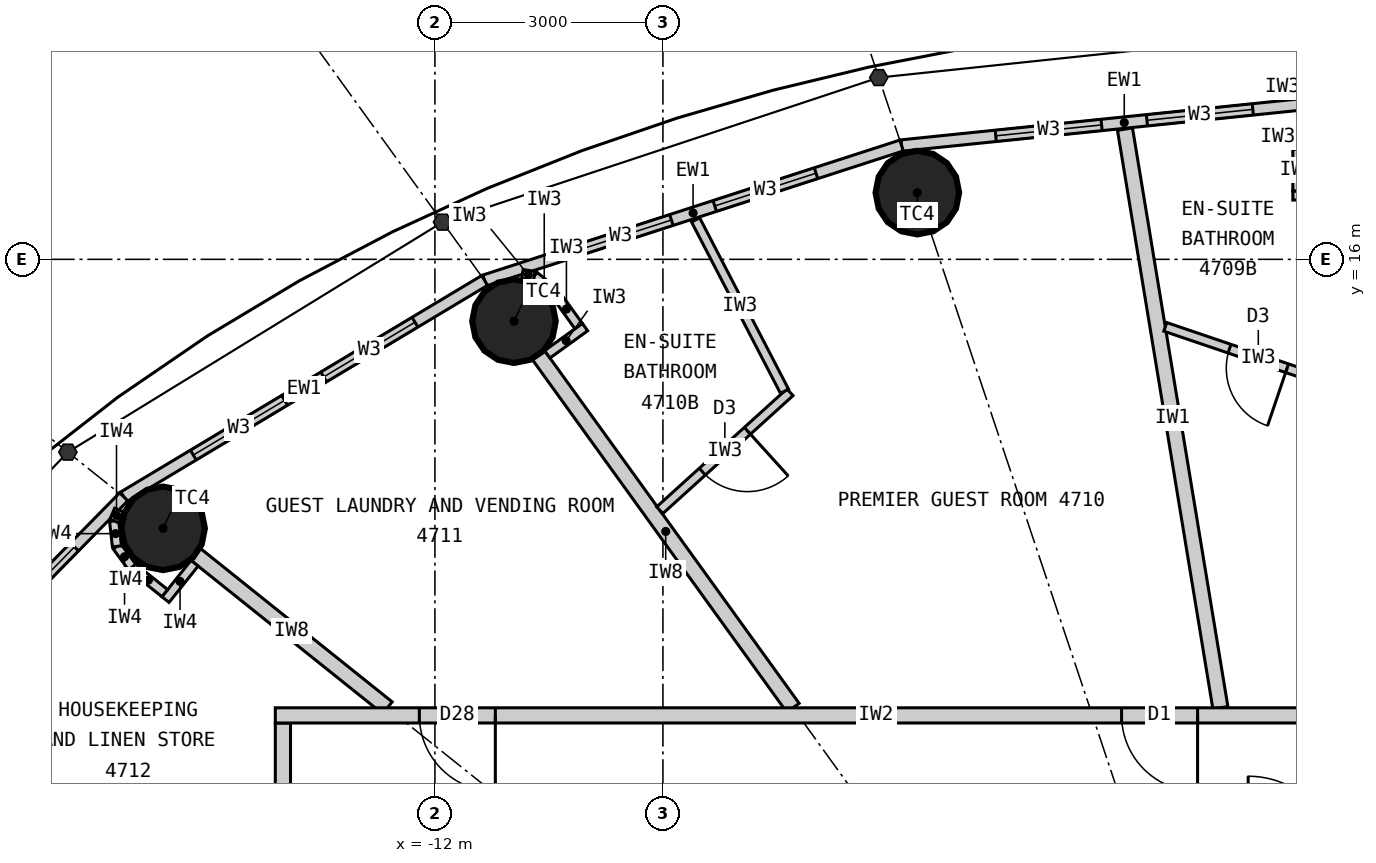
"""IFC4 building model, lengths in metres.
Left out: names, types, materials, properties, quantities, classifications, styles, units other than length and angle.
Written with IfcOpenShell. Run it as: python <this file> out.ifc"""

import sys

from ifc_helpers import new_model, si_unit, direction, frame, frame_2d, origin, origin_2d, place, context, subcontext, project, spatial, rectangle, circle, extrude, element, fill, save


model = new_model("IFC4")
c1 = context("Model", 3, precision=1e-05, world=origin(), true_north=direction((0.0, 1.0)))
c2 = subcontext(c1, "Body", "Model", "MODEL_VIEW")
j1 = project(units=[si_unit("LENGTHUNIT", "METRE"), si_unit("PLANEANGLEUNIT", "RADIAN")], contexts=[c1])
p1 = place(None, origin())
s1 = spatial("IfcSite", under=j1, at=p1, CompositionType="ELEMENT")
p2 = place(p1, origin())
s2 = spatial("IfcBuilding", under=s1, at=p2, CompositionType="ELEMENT")
p3 = place(p2, frame((0.0, 0.0, 176.4)))
s3 = spatial("IfcBuildingStorey", under=s2, at=p3, CompositionType="ELEMENT", Elevation=176.4)
for number, where, z_axis, x_axis in (
    (1, (-5.653, 16.877, 0.0), (0.0, 0.0, 1.0), (1.0, 0.0, 0.0)),
    (2, (-10.96, 15.186, 0.0), (0.0, 0.0, 1.0), (1.0, 0.0, 0.0)),
    (3, (-15.576, 12.461, 0.0), (0.0, 0.0, 1.0), (1.0, 0.0, 0.0)),
):
    element("IfcColumn", number, at=place(p3, frame(where, z_axis=z_axis, x_axis=x_axis)), inside=s3, PredefinedType="COLUMN", context=c2, shape_type="SweptSolid", body=[
        extrude(circle(Radius=0.55, at=origin_2d()), origin(), (0.0, 0.0, 1.0), 3.3),
    ])
p4 = place(p3, frame((0.0, 18.1, 0.0), z_axis=(0.0, 0.0, 1.0), x_axis=(-0.994751738032, -0.102318032045, 0.0)))
e4 = element("IfcWall", 4, at=p4, inside=s3, PredefinedType="ELEMENTEDWALL", context=c2, shape_type="SweptSolid", body=[
    extrude(rectangle(XDim=5.891, YDim=0.15, at=frame_2d((2.946, 0.0))), origin(), (0.0, 0.0, 1.0), 3.12),
])
p5 = place(p4, frame((1.246, 0.0, 0.9)))
e5 = element("IfcOpeningElement", 5, at=p5, cuts=e4, PredefinedType="OPENING", context=c2, shape_type="SweptSolid", body=[
    extrude(rectangle(XDim=1.4, YDim=1.9, at=frame_2d((0.7, 0.95))), frame((0.0, 0.085, 0.0), z_axis=(0.0, -1.0, 0.0), x_axis=(1.0, 0.0, 0.0)), (0.0, 0.0, 1.0), 0.17),
])
p6 = place(p4, frame((3.246, 0.0, 0.9)))
e6 = element("IfcOpeningElement", 6, at=p6, cuts=e4, PredefinedType="OPENING", context=c2, shape_type="SweptSolid", body=[
    extrude(rectangle(XDim=1.4, YDim=1.9, at=frame_2d((0.7, 0.95))), frame((0.0, 0.085, 0.0), z_axis=(0.0, -1.0, 0.0), x_axis=(1.0, 0.0, 0.0)), (0.0, 0.0, 1.0), 0.17),
])
p7 = place(p3, frame((-5.86, 17.497, 0.0), z_axis=(0.0, 0.0, 1.0), x_axis=(-0.951432482129, -0.307857486429, 0.0)))
e7 = element("IfcWall", 7, at=p7, inside=s3, PredefinedType="ELEMENTEDWALL", context=c2, shape_type="SweptSolid", body=[
    extrude(rectangle(XDim=5.766, YDim=0.15, at=frame_2d((2.883, 0.0))), origin(), (0.0, 0.0, 1.0), 3.12),
])
p8 = place(p7, frame((1.183, 0.0, 0.9)))
e8 = element("IfcOpeningElement", 8, at=p8, cuts=e7, PredefinedType="OPENING", context=c2, shape_type="SweptSolid", body=[
    extrude(rectangle(XDim=1.4, YDim=1.9, at=frame_2d((0.7, 0.95))), frame((0.0, 0.085, 0.0), z_axis=(0.0, -1.0, 0.0), x_axis=(1.0, 0.0, 0.0)), (0.0, 0.0, 1.0), 0.17),
])
p9 = place(p7, frame((3.183, 0.0, 0.9)))
e9 = element("IfcOpeningElement", 9, at=p9, cuts=e7, PredefinedType="OPENING", context=c2, shape_type="SweptSolid", body=[
    extrude(rectangle(XDim=1.4, YDim=1.9, at=frame_2d((0.7, 0.95))), frame((0.0, 0.085, 0.0), z_axis=(0.0, -1.0, 0.0), x_axis=(1.0, 0.0, 0.0)), (0.0, 0.0, 1.0), 0.17),
])
p10 = place(p3, frame((-11.346, 15.722, 0.0), z_axis=(0.0, 0.0, 1.0), x_axis=(-0.857695199231, -0.514158482587, 0.0)))
e10 = element("IfcWall", 10, at=p10, inside=s3, PredefinedType="ELEMENTEDWALL", context=c2, shape_type="SweptSolid", body=[
    extrude(rectangle(XDim=5.536, YDim=0.15, at=frame_2d((2.768, 0.0))), origin(), (0.0, 0.0, 1.0), 3.12),
])
p11 = place(p10, frame((1.068, 0.0, 0.9)))
e11 = element("IfcOpeningElement", 11, at=p11, cuts=e10, PredefinedType="OPENING", context=c2, shape_type="SweptSolid", body=[
    extrude(rectangle(XDim=1.4, YDim=1.9, at=frame_2d((0.7, 0.95))), frame((0.0, 0.085, 0.0), z_axis=(0.0, -1.0, 0.0), x_axis=(1.0, 0.0, 0.0)), (0.0, 0.0, 1.0), 0.17),
])
p12 = place(p10, frame((3.068, 0.0, 0.9)))
e12 = element("IfcOpeningElement", 12, at=p12, cuts=e10, PredefinedType="OPENING", context=c2, shape_type="SweptSolid", body=[
    extrude(rectangle(XDim=1.4, YDim=1.9, at=frame_2d((0.7, 0.95))), frame((0.0, 0.085, 0.0), z_axis=(0.0, -1.0, 0.0), x_axis=(1.0, 0.0, 0.0)), (0.0, 0.0, 1.0), 0.17),
])
p13 = place(p3, frame((-16.095, 12.876, 0.0), z_axis=(0.0, 0.0, 1.0), x_axis=(-0.700727467776, -0.71342905457, 0.0)))
e13 = element("IfcWall", 13, at=p13, inside=s3, PredefinedType="ELEMENTEDWALL", context=c2, shape_type="SweptSolid", body=[
    extrude(rectangle(XDim=5.247, YDim=0.15, at=frame_2d((2.624, 0.0))), origin(), (0.0, 0.0, 1.0), 3.12),
])
p14 = place(p13, frame((0.924, 0.0, 0.9)))
e14 = element("IfcOpeningElement", 14, at=p14, cuts=e13, PredefinedType="OPENING", context=c2, shape_type="SweptSolid", body=[
    extrude(rectangle(XDim=1.4, YDim=1.9, at=frame_2d((0.7, 0.95))), frame((0.0, 0.085, 0.0), z_axis=(0.0, -1.0, 0.0), x_axis=(1.0, 0.0, 0.0)), (0.0, 0.0, 1.0), 0.17),
])
p15 = place(p13, frame((2.924, 0.0, 0.9)))
e15 = element("IfcOpeningElement", 15, at=p15, cuts=e13, PredefinedType="OPENING", context=c2, shape_type="SweptSolid", body=[
    extrude(rectangle(XDim=1.4, YDim=1.9, at=frame_2d((0.7, 0.95))), frame((0.0, 0.085, 0.0), z_axis=(0.0, -1.0, 0.0), x_axis=(1.0, 0.0, 0.0)), (0.0, 0.0, 1.0), 0.17),
])
p16 = place(p3, frame((-14.0, 9.9, 0.0), z_axis=(0.0, 0.0, 1.0), x_axis=(0.0, -1.0, 0.0)))
e16 = element("IfcWall", 16, at=p16, inside=s3, PredefinedType="PARTITIONING", context=c2, shape_type="SweptSolid", body=[
    extrude(rectangle(XDim=19.8, YDim=0.2, at=frame_2d((9.9, 0.0))), origin(), (0.0, 0.0, 1.0), 3.12),
])
p17 = place(p16, frame((13.853, 0.0, 0.0)))
e17 = element("IfcOpeningElement", 17, at=p17, cuts=e16, PredefinedType="OPENING", context=c2, shape_type="SweptSolid", body=[
    extrude(rectangle(XDim=1.0, YDim=2.2, at=frame_2d((0.5, 1.1))), frame((0.0, 0.11, 0.0), z_axis=(0.0, -1.0, 0.0), x_axis=(1.0, 0.0, 0.0)), (0.0, 0.0, 1.0), 0.22),
])
p18 = place(p16, frame((1.1, 0.0, 0.0)))
e18 = element("IfcOpeningElement", 18, at=p18, cuts=e16, PredefinedType="OPENING", context=c2, shape_type="SweptSolid", body=[
    extrude(rectangle(XDim=1.0, YDim=2.2, at=frame_2d((0.5, 1.1))), frame((0.0, 0.11, 0.0), z_axis=(0.0, -1.0, 0.0), x_axis=(1.0, 0.0, 0.0)), (0.0, 0.0, 1.0), 0.22),
])
p19 = place(p16, frame((3.688, 0.0, 0.0)))
e19 = element("IfcOpeningElement", 19, at=p19, cuts=e16, PredefinedType="OPENING", context=c2, shape_type="SweptSolid", body=[
    extrude(rectangle(XDim=1.0, YDim=2.2, at=frame_2d((0.5, 1.1))), frame((0.0, 0.11, 0.0), z_axis=(0.0, -1.0, 0.0), x_axis=(1.0, 0.0, 0.0)), (0.0, 0.0, 1.0), 0.22),
])
p20 = place(p16, frame((8.719, 0.0, 0.0)))
e20 = element("IfcOpeningElement", 20, at=p20, cuts=e16, PredefinedType="OPENING", context=c2, shape_type="SweptSolid", body=[
    extrude(rectangle(XDim=1.0, YDim=2.2, at=frame_2d((0.5, 1.1))), frame((0.0, 0.11, 0.0), z_axis=(0.0, -1.0, 0.0), x_axis=(1.0, 0.0, 0.0)), (0.0, 0.0, 1.0), 0.22),
])
p21 = place(p3, frame((-1.666, 10.1, 0.0), z_axis=(0.0, 0.0, 1.0), x_axis=(-0.162669562982, 0.986680603478, 0.0)))
e21 = element("IfcWall", 21, at=p21, inside=s3, PredefinedType="PARTITIONING", context=c2, shape_type="SweptSolid", body=[
    extrude(rectangle(XDim=7.716, YDim=0.2, at=frame_2d((3.858, 0.0))), origin(), (0.0, 0.0, 1.0), 3.12),
])
p22 = place(p3, frame((-7.289, 10.1, 0.0), z_axis=(0.0, 0.0, 1.0), x_axis=(-0.585222595178, 0.810872686735, 0.0)))
e22 = element("IfcWall", 22, at=p22, inside=s3, PredefinedType="PARTITIONING", context=c2, shape_type="SweptSolid", body=[
    extrude(rectangle(XDim=5.722, YDim=0.2, at=frame_2d((2.861, 0.0))), origin(), (0.0, 0.0, 1.0), 2.42),
])
p23 = place(p3, frame((-12.625, 10.1, 0.0), z_axis=(0.0, 0.0, 1.0), x_axis=(-0.780876185034, 0.624685827954, 0.0)))
e23 = element("IfcWall", 23, at=p23, inside=s3, PredefinedType="PARTITIONING", context=c2, shape_type="SweptSolid", body=[
    extrude(rectangle(XDim=3.229, YDim=0.2, at=frame_2d((1.615, 0.0))), origin(), (0.0, 0.0, 1.0), 2.42),
])
p24 = place(p3, frame((-2.39, 15.111, 0.0), z_axis=(0.0, 0.0, 1.0), x_axis=(0.946949953534, -0.321381059649, 0.0)))
e24 = element("IfcWall", 24, at=p24, inside=s3, PredefinedType="PARTITIONING", context=c2, shape_type="SweptSolid", body=[
    extrude(rectangle(XDim=2.584, YDim=0.12, at=frame_2d((1.292, 0.0))), origin(), (0.0, 0.0, 1.0), 3.12),
])
p25 = place(p24, frame((0.892, 0.0, 0.0)))
e25 = element("IfcOpeningElement", 25, at=p25, cuts=e24, PredefinedType="OPENING", context=c2, shape_type="SweptSolid", body=[
    extrude(rectangle(XDim=0.8, YDim=2.1, at=frame_2d((0.4, 1.05))), frame((0.0, 0.07, 0.0), z_axis=(0.0, -1.0, 0.0), x_axis=(1.0, 0.0, 0.0)), (0.0, 0.0, 1.0), 0.14),
])
p26 = place(p3, frame((-0.06, 16.84, 0.0), z_axis=(0.0, 0.0, 1.0), x_axis=(-1.0, 0.0, 0.0)))
e26 = element("IfcWall", 26, at=p26, inside=s3, PredefinedType="PARTITIONING", context=c2, shape_type="SweptSolid", body=[
    extrude(rectangle(XDim=0.652, YDim=0.12, at=frame_2d((0.326, 0.0))), origin(), (0.0, 0.0, 1.0), 3.12),
])
p27 = place(p3, frame((-0.652, 16.9, 0.0), z_axis=(0.0, 0.0, 1.0), x_axis=(0.0, 1.0, 0.0)))
e27 = element("IfcWall", 27, at=p27, inside=s3, PredefinedType="PARTITIONING", context=c2, shape_type="SweptSolid", body=[
    extrude(rectangle(XDim=0.55, YDim=0.12, at=frame_2d((0.275, 0.0))), origin(), (0.0, 0.0, 1.0), 3.12),
])
p28 = place(p3, frame((-0.652, 17.45, 0.0), z_axis=(0.0, 0.0, 1.0), x_axis=(0.258832454679, 0.965922233104, 0.0)))
e28 = element("IfcWall", 28, at=p28, inside=s3, PredefinedType="PARTITIONING", context=c2, shape_type="SweptSolid", body=[
    extrude(rectangle(XDim=0.338, YDim=0.12, at=frame_2d((0.169, 0.0))), origin(), (0.0, 0.0, 1.0), 3.12),
])
p29 = place(p3, frame((-9.042, 12.699, 0.0), z_axis=(0.0, 0.0, 1.0), x_axis=(0.741100257539, 0.671394376112, 0.0)))
e29 = element("IfcWall", 29, at=p29, inside=s3, PredefinedType="PARTITIONING", context=c2, shape_type="SweptSolid", body=[
    extrude(rectangle(XDim=2.312, YDim=0.12, at=frame_2d((1.156, 0.0))), origin(), (0.0, 0.0, 1.0), 3.12),
])
p30 = place(p29, frame((0.756, 0.0, 0.0)))
e30 = element("IfcOpeningElement", 30, at=p30, cuts=e29, PredefinedType="OPENING", context=c2, shape_type="SweptSolid", body=[
    extrude(rectangle(XDim=0.8, YDim=2.1, at=frame_2d((0.4, 1.05))), frame((0.0, 0.07, 0.0), z_axis=(0.0, -1.0, 0.0), x_axis=(1.0, 0.0, 0.0)), (0.0, 0.0, 1.0), 0.14),
])
p31 = place(p3, frame((-7.401, 14.264, 0.0), z_axis=(0.0, 0.0, 1.0), x_axis=(-0.460505131319, 0.887657041897, 0.0)))
e31 = element("IfcWall", 31, at=p31, inside=s3, PredefinedType="PARTITIONING", context=c2, shape_type="SweptSolid", body=[
    extrude(rectangle(XDim=2.54, YDim=0.12, at=frame_2d((1.27, 0.0))), origin(), (0.0, 0.0, 1.0), 3.12),
])
p32 = place(p3, frame((-10.522, 14.75, 0.0), z_axis=(0.0, 0.0, 1.0), x_axis=(0.811057588427, 0.584966313777, 0.0)))
e32 = element("IfcWall", 32, at=p32, inside=s3, PredefinedType="PARTITIONING", context=c2, shape_type="SweptSolid", body=[
    extrude(rectangle(XDim=0.612, YDim=0.12, at=frame_2d((0.306, 0.0))), origin(), (0.0, 0.0, 1.0), 3.12),
])
p33 = place(p3, frame((-10.109, 15.122, 0.0), z_axis=(0.0, 0.0, 1.0), x_axis=(-0.585344718358, 0.810784534072, 0.0)))
e33 = element("IfcWall", 33, at=p33, inside=s3, PredefinedType="PARTITIONING", context=c2, shape_type="SweptSolid", body=[
    extrude(rectangle(XDim=0.55, YDim=0.12, at=frame_2d((0.275, 0.0))), origin(), (0.0, 0.0, 1.0), 3.12),
])
p34 = place(p3, frame((-10.431, 15.568, 0.0), z_axis=(0.0, 0.0, 1.0), x_axis=(-0.77505137267, 0.631898227345, 0.0)))
e34 = element("IfcWall", 34, at=p34, inside=s3, PredefinedType="PARTITIONING", context=c2, shape_type="SweptSolid", body=[
    extrude(rectangle(XDim=0.338, YDim=0.12, at=frame_2d((0.169, 0.0))), origin(), (0.0, 0.0, 1.0), 3.12),
])
p35 = place(p3, frame((-10.693, 15.781, 0.0), z_axis=(0.0, 0.0, 1.0), x_axis=(-0.987256785332, 0.159135287777, 0.0)))
e35 = element("IfcWall", 35, at=p35, inside=s3, PredefinedType="PARTITIONING", context=c2, shape_type="SweptSolid", body=[
    extrude(rectangle(XDim=0.158, YDim=0.12, at=frame_2d((0.079, 0.0))), origin(), (0.0, 0.0, 1.0), 3.12),
])
p36 = place(p3, frame((-14.1, 10.0, 0.0), z_axis=(0.0, 0.0, 1.0), x_axis=(1.0, 0.0, 0.0)))
e36 = element("IfcWall", 36, at=p36, inside=s3, PredefinedType="PARTITIONING", context=c2, shape_type="SweptSolid", body=[
    extrude(rectangle(XDim=15.808, YDim=0.2, at=frame_2d((7.904, 0.0))), origin(), (0.0, 0.0, 1.0), 3.12),
])
p37 = place(p36, frame((11.135, 0.0, 0.0)))
e37 = element("IfcOpeningElement", 37, at=p37, cuts=e36, PredefinedType="OPENING", context=c2, shape_type="SweptSolid", body=[
    extrude(rectangle(XDim=1.0, YDim=2.2, at=frame_2d((0.5, 1.1))), frame((0.0, 0.11, 0.0), z_axis=(0.0, -1.0, 0.0), x_axis=(1.0, 0.0, 0.0)), (0.0, 0.0, 1.0), 0.22),
])
p38 = place(p36, frame((1.895, 0.0, 0.0)))
e38 = element("IfcOpeningElement", 38, at=p38, cuts=e36, PredefinedType="OPENING", context=c2, shape_type="SweptSolid", body=[
    extrude(rectangle(XDim=1.0, YDim=2.2, at=frame_2d((0.5, 1.1))), frame((0.0, 0.11, 0.0), z_axis=(0.0, -1.0, 0.0), x_axis=(1.0, 0.0, 0.0)), (0.0, 0.0, 1.0), 0.22),
])
p39 = place(p3, frame((-15.162, 12.002, 0.0), z_axis=(0.0, 0.0, 1.0), x_axis=(-0.624597762427, -0.780946627607, 0.0)))
e39 = element("IfcWall", 39, at=p39, inside=s3, PredefinedType="PARTITIONING", context=c2, shape_type="SweptSolid", body=[
    extrude(rectangle(XDim=0.612, YDim=0.12, at=frame_2d((0.306, 0.0))), origin(), (0.0, 0.0, 1.0), 3.12),
])
p40 = place(p3, frame((-15.554, 11.608, 0.0), z_axis=(0.0, 0.0, 1.0), x_axis=(-0.780695577787, 0.624911525597, 0.0)))
e40 = element("IfcWall", 40, at=p40, inside=s3, PredefinedType="PARTITIONING", context=c2, shape_type="SweptSolid", body=[
    extrude(rectangle(XDim=0.55, YDim=0.12, at=frame_2d((0.275, 0.0))), origin(), (0.0, 0.0, 1.0), 3.12),
])
p41 = place(p3, frame((-15.984, 11.952, 0.0), z_axis=(0.0, 0.0, 1.0), x_axis=(-0.592335221171, 0.805691619517, 0.0)))
e41 = element("IfcWall", 41, at=p41, inside=s3, PredefinedType="PARTITIONING", context=c2, shape_type="SweptSolid", body=[
    extrude(rectangle(XDim=0.338, YDim=0.12, at=frame_2d((0.169, 0.0))), origin(), (0.0, 0.0, 1.0), 3.12),
])
p42 = place(p3, frame((-16.184, 12.224, 0.0), z_axis=(0.0, 0.0, 1.0), x_axis=(-0.110669692975, 0.993857242795, 0.0)))
e42 = element("IfcWall", 42, at=p42, inside=s3, PredefinedType="PARTITIONING", context=c2, shape_type="SweptSolid", body=[
    extrude(rectangle(XDim=0.337, YDim=0.12, at=frame_2d((0.169, 0.0))), origin(), (0.0, 0.0, 1.0), 3.12),
])
p43 = place(p3, frame((-16.221, 12.559, 0.0), z_axis=(0.0, 0.0, 1.0), x_axis=(0.401064416249, 0.916049853457, 0.0)))
e43 = element("IfcWall", 43, at=p43, inside=s3, PredefinedType="PARTITIONING", context=c2, shape_type="SweptSolid", body=[
    extrude(rectangle(XDim=0.156, YDim=0.12, at=frame_2d((0.078, 0.0))), origin(), (0.0, 0.0, 1.0), 3.12),
])
p44 = place(p5, origin())
e44 = element("IfcWindow", 44, at=p44, inside=s3, PartitioningType="SINGLE_PANEL", PredefinedType="WINDOW", context=c2, shape_type="SweptSolid", body=[
    extrude(rectangle(XDim=1.4, YDim=1.9, at=frame_2d((0.7, 0.95))), frame((0.0, 0.03, 0.0), z_axis=(0.0, -1.0, 0.0), x_axis=(1.0, 0.0, 0.0)), (0.0, 0.0, 1.0), 0.06),
])
fill(e5, e44)
p45 = place(p6, origin())
e45 = element("IfcWindow", 45, at=p45, inside=s3, PartitioningType="SINGLE_PANEL", PredefinedType="WINDOW", context=c2, shape_type="SweptSolid", body=[
    extrude(rectangle(XDim=1.4, YDim=1.9, at=frame_2d((0.7, 0.95))), frame((0.0, 0.03, 0.0), z_axis=(0.0, -1.0, 0.0), x_axis=(1.0, 0.0, 0.0)), (0.0, 0.0, 1.0), 0.06),
])
fill(e6, e45)
p46 = place(p8, origin())
e46 = element("IfcWindow", 46, at=p46, inside=s3, PartitioningType="SINGLE_PANEL", PredefinedType="WINDOW", context=c2, shape_type="SweptSolid", body=[
    extrude(rectangle(XDim=1.4, YDim=1.9, at=frame_2d((0.7, 0.95))), frame((0.0, 0.03, 0.0), z_axis=(0.0, -1.0, 0.0), x_axis=(1.0, 0.0, 0.0)), (0.0, 0.0, 1.0), 0.06),
])
fill(e8, e46)
p47 = place(p9, origin())
e47 = element("IfcWindow", 47, at=p47, inside=s3, PartitioningType="SINGLE_PANEL", PredefinedType="WINDOW", context=c2, shape_type="SweptSolid", body=[
    extrude(rectangle(XDim=1.4, YDim=1.9, at=frame_2d((0.7, 0.95))), frame((0.0, 0.03, 0.0), z_axis=(0.0, -1.0, 0.0), x_axis=(1.0, 0.0, 0.0)), (0.0, 0.0, 1.0), 0.06),
])
fill(e9, e47)
p48 = place(p11, origin())
e48 = element("IfcWindow", 48, at=p48, inside=s3, PartitioningType="SINGLE_PANEL", PredefinedType="WINDOW", context=c2, shape_type="SweptSolid", body=[
    extrude(rectangle(XDim=1.4, YDim=1.9, at=frame_2d((0.7, 0.95))), frame((0.0, 0.03, 0.0), z_axis=(0.0, -1.0, 0.0), x_axis=(1.0, 0.0, 0.0)), (0.0, 0.0, 1.0), 0.06),
])
fill(e11, e48)
p49 = place(p12, origin())
e49 = element("IfcWindow", 49, at=p49, inside=s3, PartitioningType="SINGLE_PANEL", PredefinedType="WINDOW", context=c2, shape_type="SweptSolid", body=[
    extrude(rectangle(XDim=1.4, YDim=1.9, at=frame_2d((0.7, 0.95))), frame((0.0, 0.03, 0.0), z_axis=(0.0, -1.0, 0.0), x_axis=(1.0, 0.0, 0.0)), (0.0, 0.0, 1.0), 0.06),
])
fill(e12, e49)
p50 = place(p14, origin())
e50 = element("IfcWindow", 50, at=p50, inside=s3, PartitioningType="SINGLE_PANEL", PredefinedType="WINDOW", context=c2, shape_type="SweptSolid", body=[
    extrude(rectangle(XDim=1.4, YDim=1.9, at=frame_2d((0.7, 0.95))), frame((0.0, 0.03, 0.0), z_axis=(0.0, -1.0, 0.0), x_axis=(1.0, 0.0, 0.0)), (0.0, 0.0, 1.0), 0.06),
])
fill(e14, e50)
p51 = place(p25, origin())
e51 = element("IfcDoor", 51, at=p51, inside=s3, OperationType="SINGLE_SWING_RIGHT", PredefinedType="DOOR", context=c2, shape_type="SweptSolid", body=[
    extrude(rectangle(XDim=0.8, YDim=2.1, at=frame_2d((0.4, 1.05))), frame((0.0, 0.025, 0.0), z_axis=(0.0, -1.0, 0.0), x_axis=(1.0, 0.0, 0.0)), (0.0, 0.0, 1.0), 0.05),
])
fill(e25, e51)
p52 = place(p30, origin())
e52 = element("IfcDoor", 52, at=p52, inside=s3, OperationType="SINGLE_SWING_RIGHT", PredefinedType="DOOR", context=c2, shape_type="SweptSolid", body=[
    extrude(rectangle(XDim=0.8, YDim=2.1, at=frame_2d((0.4, 1.05))), frame((0.0, 0.025, 0.0), z_axis=(0.0, -1.0, 0.0), x_axis=(1.0, 0.0, 0.0)), (0.0, 0.0, 1.0), 0.05),
])
fill(e30, e52)
p53 = place(p37, origin())
e53 = element("IfcDoor", 53, at=p53, inside=s3, OperationType="SINGLE_SWING_RIGHT", PredefinedType="DOOR", context=c2, shape_type="SweptSolid", body=[
    extrude(rectangle(XDim=1.0, YDim=2.2, at=frame_2d((0.5, 1.1))), frame((0.0, 0.025, 0.0), z_axis=(0.0, -1.0, 0.0), x_axis=(1.0, 0.0, 0.0)), (0.0, 0.0, 1.0), 0.05),
])
fill(e37, e53)
p54 = place(p38, origin())
e54 = element("IfcDoor", 54, at=p54, inside=s3, OperationType="SINGLE_SWING_RIGHT", PredefinedType="DOOR", context=c2, shape_type="SweptSolid", body=[
    extrude(rectangle(XDim=1.0, YDim=2.2, at=frame_2d((0.5, 1.1))), frame((0.0, 0.025, 0.0), z_axis=(0.0, -1.0, 0.0), x_axis=(1.0, 0.0, 0.0)), (0.0, 0.0, 1.0), 0.05),
])
fill(e38, e54)
save(model, sys.argv[1])
